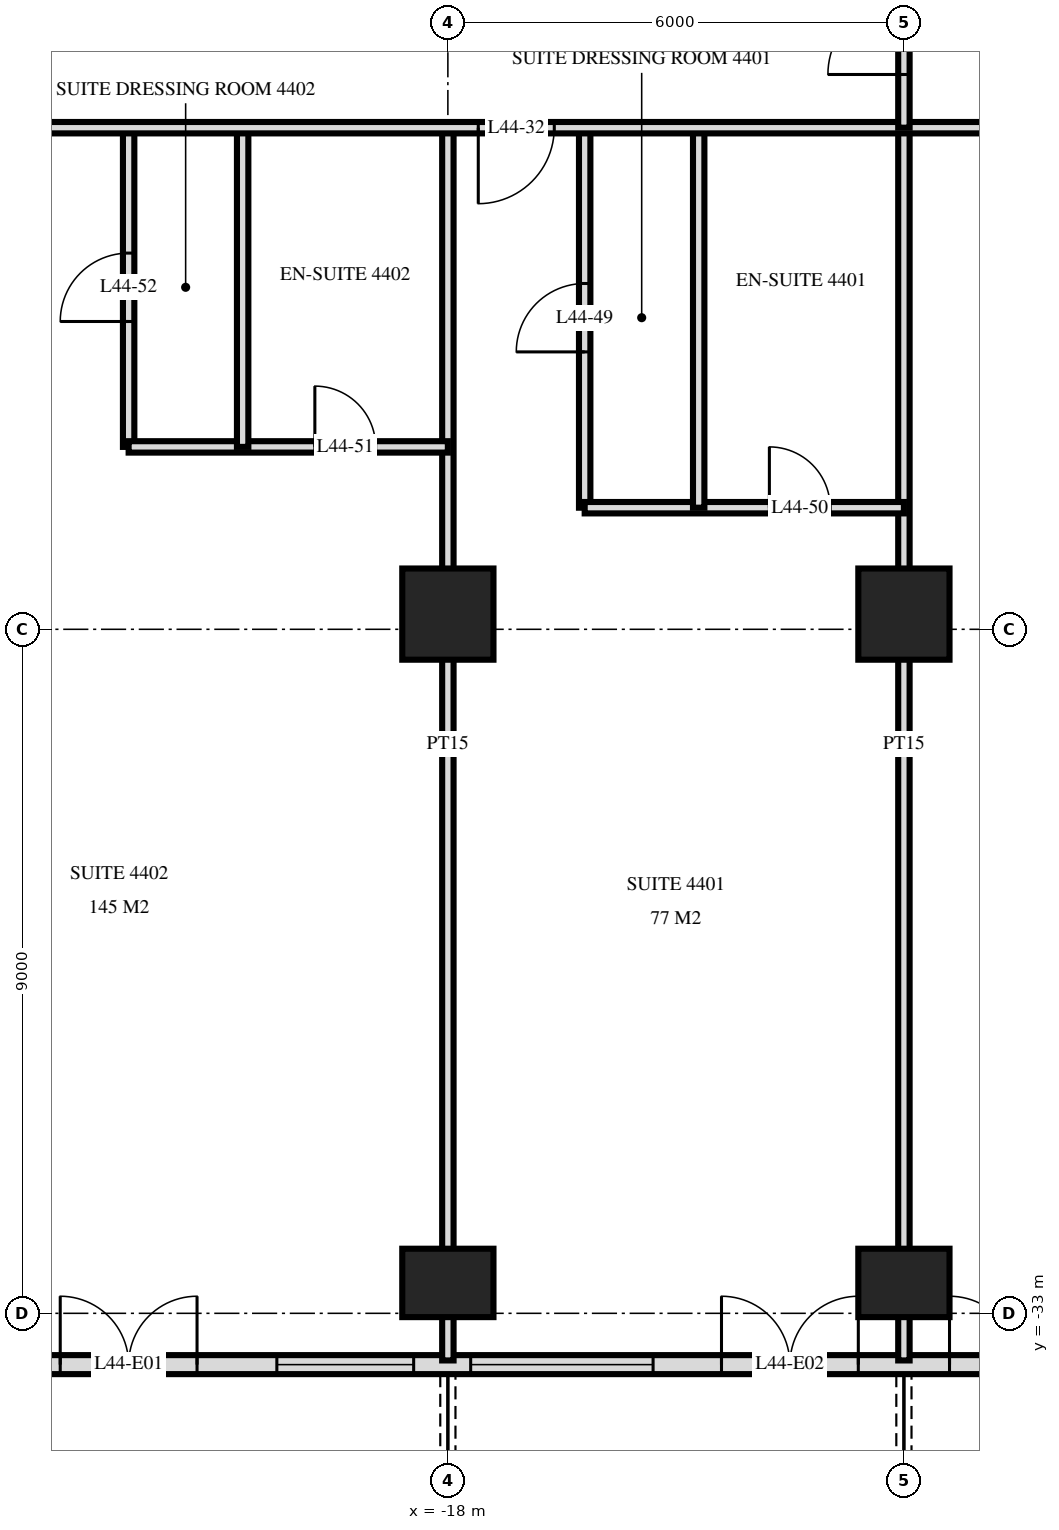
"""IFC4 building model, lengths in metres.
Left out: names, types, materials, properties, quantities, classifications, styles, units other than length and angle.
Written with IfcOpenShell. Run it as: python <this file> out.ifc"""

import sys

from ifc_helpers import new_model, si_unit, direction, frame, frame_2d, origin, origin_2d, place, context, subcontext, project, spatial, rectangle, extrude, element, fill, save


model = new_model("IFC4")
c1 = context("Model", 3, precision=1e-05, world=origin(), true_north=direction((0.0, 1.0)))
c2 = subcontext(c1, "Body", "Model", "MODEL_VIEW")
j1 = project(units=[si_unit("LENGTHUNIT", "METRE"), si_unit("PLANEANGLEUNIT", "RADIAN")], contexts=[c1])
p1 = place(None, origin())
s1 = spatial("IfcSite", under=j1, at=p1, CompositionType="ELEMENT")
p2 = place(p1, origin())
s2 = spatial("IfcBuilding", under=s1, at=p2, CompositionType="ELEMENT")
p3 = place(p2, frame((0.0, 0.0, 170.4)))
s3 = spatial("IfcBuildingStorey", under=s2, at=p3, CompositionType="ELEMENT", Elevation=170.4)
p4 = place(p3, frame((-18.0, -32.6, 0.0), z_axis=(0.0, 0.0, 1.0), x_axis=(1.0, 0.0, 0.0)))
e1 = element("IfcColumn", 1, at=p4, inside=s3, PredefinedType="COLUMN", context=c2, shape_type="SweptSolid", body=[
    extrude(rectangle(XDim=1.2, YDim=0.9, at=origin_2d()), origin(), (0.0, 0.0, 1.0), 3.6),
])
p5 = place(p3, frame((-18.0, -23.8, 0.0), z_axis=(0.0, 0.0, 1.0), x_axis=(1.0, 0.0, 0.0)))
e2 = element("IfcColumn", 2, at=p5, inside=s3, PredefinedType="COLUMN", context=c2, shape_type="SweptSolid", body=[
    extrude(rectangle(XDim=1.2, YDim=1.2, at=origin_2d()), origin(), (0.0, 0.0, 1.0), 3.6),
])
p6 = place(p3, frame((-12.0, -32.6, 0.0), z_axis=(0.0, 0.0, 1.0), x_axis=(1.0, 0.0, 0.0)))
e3 = element("IfcColumn", 3, at=p6, inside=s3, PredefinedType="COLUMN", context=c2, shape_type="SweptSolid", body=[
    extrude(rectangle(XDim=1.2, YDim=0.9, at=origin_2d()), origin(), (0.0, 0.0, 1.0), 3.6),
])
p7 = place(p3, frame((-12.0, -23.8, 0.0), z_axis=(0.0, 0.0, 1.0), x_axis=(1.0, 0.0, 0.0)))
e4 = element("IfcColumn", 4, at=p7, inside=s3, PredefinedType="COLUMN", context=c2, shape_type="SweptSolid", body=[
    extrude(rectangle(XDim=1.2, YDim=1.2, at=origin_2d()), origin(), (0.0, 0.0, 1.0), 3.6),
])
p8 = place(p3, frame((-23.675, -33.675, 0.0), z_axis=(0.0, 0.0, 1.0), x_axis=(1.0, 0.0, 0.0)))
e5 = element("IfcWall", 5, at=p8, inside=s3, PredefinedType="SOLIDWALL", context=c2, shape_type="SweptSolid", body=[
    extrude(rectangle(XDim=47.351, YDim=0.25, at=frame_2d((23.675, 0.0))), origin(), (0.0, 0.0, 1.0), 3.32),
])
p9 = place(p8, frame((0.575, 0.0, 0.0)))
e6 = element("IfcOpeningElement", 6, at=p9, cuts=e5, PredefinedType="OPENING", context=c2, shape_type="SweptSolid", body=[
    extrude(rectangle(XDim=1.8, YDim=2.4, at=frame_2d((0.9, 1.2))), frame((0.0, 0.135, 0.0), z_axis=(0.0, -1.0, 0.0), x_axis=(1.0, 0.0, 0.0)), (0.0, 0.0, 1.0), 0.27),
])
p10 = place(p8, frame((3.425, 0.0, 0.3)))
e7 = element("IfcOpeningElement", 7, at=p10, cuts=e5, PredefinedType="OPENING", context=c2, shape_type="SweptSolid", body=[
    extrude(rectangle(XDim=1.8, YDim=2.1, at=frame_2d((0.9, 1.05))), frame((0.0, 0.135, 0.0), z_axis=(0.0, -1.0, 0.0), x_axis=(1.0, 0.0, 0.0)), (0.0, 0.0, 1.0), 0.27),
])
p11 = place(p8, frame((5.975, 0.0, 0.3)))
e8 = element("IfcOpeningElement", 8, at=p11, cuts=e5, PredefinedType="OPENING", context=c2, shape_type="SweptSolid", body=[
    extrude(rectangle(XDim=2.4, YDim=2.1, at=frame_2d((1.2, 1.05))), frame((0.0, 0.135, 0.0), z_axis=(0.0, -1.0, 0.0), x_axis=(1.0, 0.0, 0.0)), (0.0, 0.0, 1.0), 0.27),
])
p12 = place(p8, frame((9.275, 0.0, 0.0)))
e9 = element("IfcOpeningElement", 9, at=p12, cuts=e5, PredefinedType="OPENING", context=c2, shape_type="SweptSolid", body=[
    extrude(rectangle(XDim=1.8, YDim=2.4, at=frame_2d((0.9, 1.2))), frame((0.0, 0.135, 0.0), z_axis=(0.0, -1.0, 0.0), x_axis=(1.0, 0.0, 0.0)), (0.0, 0.0, 1.0), 0.27),
])
p13 = place(p8, frame((12.275, 0.0, 0.0)))
e10 = element("IfcOpeningElement", 10, at=p13, cuts=e5, PredefinedType="OPENING", context=c2, shape_type="SweptSolid", body=[
    extrude(rectangle(XDim=1.8, YDim=2.4, at=frame_2d((0.9, 1.2))), frame((0.0, 0.135, 0.0), z_axis=(0.0, -1.0, 0.0), x_axis=(1.0, 0.0, 0.0)), (0.0, 0.0, 1.0), 0.27),
])
p14 = place(p8, frame((14.975, 0.0, 0.3)))
e11 = element("IfcOpeningElement", 11, at=p14, cuts=e5, PredefinedType="OPENING", context=c2, shape_type="SweptSolid", body=[
    extrude(rectangle(XDim=2.4, YDim=2.1, at=frame_2d((1.2, 1.05))), frame((0.0, 0.135, 0.0), z_axis=(0.0, -1.0, 0.0), x_axis=(1.0, 0.0, 0.0)), (0.0, 0.0, 1.0), 0.27),
])
p15 = place(p8, frame((17.975, 0.0, 0.3)))
e12 = element("IfcOpeningElement", 12, at=p15, cuts=e5, PredefinedType="OPENING", context=c2, shape_type="SweptSolid", body=[
    extrude(rectangle(XDim=2.4, YDim=2.1, at=frame_2d((1.2, 1.05))), frame((0.0, 0.135, 0.0), z_axis=(0.0, -1.0, 0.0), x_axis=(1.0, 0.0, 0.0)), (0.0, 0.0, 1.0), 0.27),
])
p16 = place(p8, frame((21.275, 0.0, 0.0)))
e13 = element("IfcOpeningElement", 13, at=p16, cuts=e5, PredefinedType="OPENING", context=c2, shape_type="SweptSolid", body=[
    extrude(rectangle(XDim=1.8, YDim=2.4, at=frame_2d((0.9, 1.2))), frame((0.0, 0.135, 0.0), z_axis=(0.0, -1.0, 0.0), x_axis=(1.0, 0.0, 0.0)), (0.0, 0.0, 1.0), 0.27),
])
p17 = place(p8, frame((24.275, 0.0, 0.0)))
e14 = element("IfcOpeningElement", 14, at=p17, cuts=e5, PredefinedType="OPENING", context=c2, shape_type="SweptSolid", body=[
    extrude(rectangle(XDim=1.8, YDim=2.4, at=frame_2d((0.9, 1.2))), frame((0.0, 0.135, 0.0), z_axis=(0.0, -1.0, 0.0), x_axis=(1.0, 0.0, 0.0)), (0.0, 0.0, 1.0), 0.27),
])
p18 = place(p8, frame((26.975, 0.0, 0.3)))
e15 = element("IfcOpeningElement", 15, at=p18, cuts=e5, PredefinedType="OPENING", context=c2, shape_type="SweptSolid", body=[
    extrude(rectangle(XDim=2.4, YDim=2.1, at=frame_2d((1.2, 1.05))), frame((0.0, 0.135, 0.0), z_axis=(0.0, -1.0, 0.0), x_axis=(1.0, 0.0, 0.0)), (0.0, 0.0, 1.0), 0.27),
])
p19 = place(p8, frame((30.275, 0.0, 0.0)))
e16 = element("IfcOpeningElement", 16, at=p19, cuts=e5, PredefinedType="OPENING", context=c2, shape_type="SweptSolid", body=[
    extrude(rectangle(XDim=1.8, YDim=2.4, at=frame_2d((0.9, 1.2))), frame((0.0, 0.135, 0.0), z_axis=(0.0, -1.0, 0.0), x_axis=(1.0, 0.0, 0.0)), (0.0, 0.0, 1.0), 0.27),
])
p20 = place(p8, frame((32.975, 0.0, 0.3)))
e17 = element("IfcOpeningElement", 17, at=p20, cuts=e5, PredefinedType="OPENING", context=c2, shape_type="SweptSolid", body=[
    extrude(rectangle(XDim=2.4, YDim=2.1, at=frame_2d((1.2, 1.05))), frame((0.0, 0.135, 0.0), z_axis=(0.0, -1.0, 0.0), x_axis=(1.0, 0.0, 0.0)), (0.0, 0.0, 1.0), 0.27),
])
p21 = place(p8, frame((35.975, 0.0, 0.3)))
e18 = element("IfcOpeningElement", 18, at=p21, cuts=e5, PredefinedType="OPENING", context=c2, shape_type="SweptSolid", body=[
    extrude(rectangle(XDim=2.4, YDim=2.1, at=frame_2d((1.2, 1.05))), frame((0.0, 0.135, 0.0), z_axis=(0.0, -1.0, 0.0), x_axis=(1.0, 0.0, 0.0)), (0.0, 0.0, 1.0), 0.27),
])
p22 = place(p8, frame((39.275, 0.0, 0.0)))
e19 = element("IfcOpeningElement", 19, at=p22, cuts=e5, PredefinedType="OPENING", context=c2, shape_type="SweptSolid", body=[
    extrude(rectangle(XDim=1.8, YDim=2.4, at=frame_2d((0.9, 1.2))), frame((0.0, 0.135, 0.0), z_axis=(0.0, -1.0, 0.0), x_axis=(1.0, 0.0, 0.0)), (0.0, 0.0, 1.0), 0.27),
])
p23 = place(p8, frame((42.275, 0.0, 0.0)))
e20 = element("IfcOpeningElement", 20, at=p23, cuts=e5, PredefinedType="OPENING", context=c2, shape_type="SweptSolid", body=[
    extrude(rectangle(XDim=1.8, YDim=2.4, at=frame_2d((0.9, 1.2))), frame((0.0, 0.135, 0.0), z_axis=(0.0, -1.0, 0.0), x_axis=(1.0, 0.0, 0.0)), (0.0, 0.0, 1.0), 0.27),
])
p24 = place(p8, frame((45.125, 0.0, 0.3)))
e21 = element("IfcOpeningElement", 21, at=p24, cuts=e5, PredefinedType="OPENING", context=c2, shape_type="SweptSolid", body=[
    extrude(rectangle(XDim=1.8, YDim=2.1, at=frame_2d((0.9, 1.05))), frame((0.0, 0.135, 0.0), z_axis=(0.0, -1.0, 0.0), x_axis=(1.0, 0.0, 0.0)), (0.0, 0.0, 1.0), 0.27),
])
p25 = place(p3, frame((-12.0, -17.4, 0.0), z_axis=(0.0, 0.0, 1.0), x_axis=(0.0, 1.0, 0.0)))
e22 = element("IfcWall", 22, at=p25, inside=s3, PredefinedType="PARTITIONING", context=c2, shape_type="SweptSolid", body=[
    extrude(rectangle(XDim=2.35, YDim=0.15, at=frame_2d((1.175, 0.0))), origin(), (0.0, 0.0, 1.0), 3.32),
])
p26 = place(p25, frame((0.7, 0.0, 0.0)))
e23 = element("IfcOpeningElement", 23, at=p26, cuts=e22, PredefinedType="OPENING", context=c2, shape_type="SweptSolid", body=[
    extrude(rectangle(XDim=1.0, YDim=2.1, at=frame_2d((0.5, 1.05))), frame((0.0, 0.085, 0.0), z_axis=(0.0, -1.0, 0.0), x_axis=(1.0, 0.0, 0.0)), (0.0, 0.0, 1.0), 0.17),
])
p27 = place(p3, frame((-12.0, -33.62, 0.0), z_axis=(0.0, 0.0, 1.0), x_axis=(0.0, 1.0, 0.0)))
e24 = element("IfcWall", 24, at=p27, inside=s3, PredefinedType="PARTITIONING", context=c2, shape_type="SweptSolid", body=[
    extrude(rectangle(XDim=16.22, YDim=0.15, at=frame_2d((8.11, 0.0))), origin(), (0.0, 0.0, 1.0), 3.32),
])
p28 = place(p3, frame((-14.7, -22.4, 0.0), z_axis=(0.0, 0.0, 1.0), x_axis=(0.0, 1.0, 0.0)))
e25 = element("IfcWall", 25, at=p28, inside=s3, PredefinedType="PARTITIONING", context=c2, shape_type="SweptSolid", body=[
    extrude(rectangle(XDim=5.0, YDim=0.15, at=frame_2d((2.5, 0.0))), origin(), (0.0, 0.0, 1.0), 3.32),
])
p29 = place(p3, frame((-16.2, -22.4, 0.0), z_axis=(0.0, 0.0, 1.0), x_axis=(0.0, 1.0, 0.0)))
e26 = element("IfcWall", 26, at=p29, inside=s3, PredefinedType="PARTITIONING", context=c2, shape_type="SweptSolid", body=[
    extrude(rectangle(XDim=5.0, YDim=0.15, at=frame_2d((2.5, 0.0))), origin(), (0.0, 0.0, 1.0), 3.32),
])
p30 = place(p29, frame((2.05, 0.0, 0.0)))
e27 = element("IfcOpeningElement", 27, at=p30, cuts=e26, PredefinedType="OPENING", context=c2, shape_type="SweptSolid", body=[
    extrude(rectangle(XDim=0.9, YDim=2.1, at=frame_2d((0.45, 1.05))), frame((0.0, 0.085, 0.0), z_axis=(0.0, -1.0, 0.0), x_axis=(1.0, 0.0, 0.0)), (0.0, 0.0, 1.0), 0.17),
])
p31 = place(p3, frame((-18.0, -33.62, 0.0), z_axis=(0.0, 0.0, 1.0), x_axis=(0.0, 1.0, 0.0)))
e28 = element("IfcWall", 28, at=p31, inside=s3, PredefinedType="PARTITIONING", context=c2, shape_type="SweptSolid", body=[
    extrude(rectangle(XDim=16.22, YDim=0.15, at=frame_2d((8.11, 0.0))), origin(), (0.0, 0.0, 1.0), 3.32),
])
p32 = place(p3, frame((-20.7, -21.6, 0.0), z_axis=(0.0, 0.0, 1.0), x_axis=(0.0, 1.0, 0.0)))
e29 = element("IfcWall", 29, at=p32, inside=s3, PredefinedType="PARTITIONING", context=c2, shape_type="SweptSolid", body=[
    extrude(rectangle(XDim=4.2, YDim=0.15, at=frame_2d((2.1, 0.0))), origin(), (0.0, 0.0, 1.0), 3.32),
])
p33 = place(p3, frame((-22.2, -21.6, 0.0), z_axis=(0.0, 0.0, 1.0), x_axis=(0.0, 1.0, 0.0)))
e30 = element("IfcWall", 30, at=p33, inside=s3, PredefinedType="PARTITIONING", context=c2, shape_type="SweptSolid", body=[
    extrude(rectangle(XDim=4.2, YDim=0.15, at=frame_2d((2.1, 0.0))), origin(), (0.0, 0.0, 1.0), 3.32),
])
p34 = place(p33, frame((1.65, 0.0, 0.0)))
e31 = element("IfcOpeningElement", 31, at=p34, cuts=e30, PredefinedType="OPENING", context=c2, shape_type="SweptSolid", body=[
    extrude(rectangle(XDim=0.9, YDim=2.1, at=frame_2d((0.45, 1.05))), frame((0.0, 0.085, 0.0), z_axis=(0.0, -1.0, 0.0), x_axis=(1.0, 0.0, 0.0)), (0.0, 0.0, 1.0), 0.17),
])
p35 = place(p3, frame((-16.2, -22.4, 0.0), z_axis=(0.0, 0.0, 1.0), x_axis=(1.0, 0.0, 0.0)))
e32 = element("IfcWall", 32, at=p35, inside=s3, PredefinedType="PARTITIONING", context=c2, shape_type="SweptSolid", body=[
    extrude(rectangle(XDim=4.2, YDim=0.15, at=frame_2d((2.1, 0.0))), origin(), (0.0, 0.0, 1.0), 3.32),
])
p36 = place(p35, frame((2.43, 0.0, 0.0)))
e33 = element("IfcOpeningElement", 33, at=p36, cuts=e32, PredefinedType="OPENING", context=c2, shape_type="SweptSolid", body=[
    extrude(rectangle(XDim=0.8, YDim=2.1, at=frame_2d((0.4, 1.05))), frame((0.0, 0.085, 0.0), z_axis=(0.0, -1.0, 0.0), x_axis=(1.0, 0.0, 0.0)), (0.0, 0.0, 1.0), 0.17),
])
p37 = place(p3, frame((-22.2, -21.6, 0.0), z_axis=(0.0, 0.0, 1.0), x_axis=(1.0, 0.0, 0.0)))
e34 = element("IfcWall", 34, at=p37, inside=s3, PredefinedType="PARTITIONING", context=c2, shape_type="SweptSolid", body=[
    extrude(rectangle(XDim=4.2, YDim=0.15, at=frame_2d((2.1, 0.0))), origin(), (0.0, 0.0, 1.0), 3.32),
])
p38 = place(p37, frame((2.45, 0.0, 0.0)))
e35 = element("IfcOpeningElement", 35, at=p38, cuts=e34, PredefinedType="OPENING", context=c2, shape_type="SweptSolid", body=[
    extrude(rectangle(XDim=0.8, YDim=2.1, at=frame_2d((0.4, 1.05))), frame((0.0, 0.085, 0.0), z_axis=(0.0, -1.0, 0.0), x_axis=(1.0, 0.0, 0.0)), (0.0, 0.0, 1.0), 0.17),
])
p39 = place(p3, frame((-28.02, -17.4, 0.0), z_axis=(0.0, 0.0, 1.0), x_axis=(1.0, 0.0, 0.0)))
e36 = element("IfcWall", 36, at=p39, inside=s3, PredefinedType="PARTITIONING", context=c2, shape_type="SweptSolid", body=[
    extrude(rectangle(XDim=56.04, YDim=0.15, at=frame_2d((28.02, 0.0))), origin(), (0.0, 0.0, 1.0), 3.32),
])
p40 = place(p39, frame((10.42, 0.0, 0.0)))
e37 = element("IfcOpeningElement", 37, at=p40, cuts=e36, PredefinedType="OPENING", context=c2, shape_type="SweptSolid", body=[
    extrude(rectangle(XDim=1.0, YDim=2.1, at=frame_2d((0.5, 1.05))), frame((0.0, 0.085, 0.0), z_axis=(0.0, -1.0, 0.0), x_axis=(1.0, 0.0, 0.0)), (0.0, 0.0, 1.0), 0.17),
])
p41 = place(p39, frame((2.32, 0.0, 0.0)))
e38 = element("IfcOpeningElement", 38, at=p41, cuts=e36, PredefinedType="OPENING", context=c2, shape_type="SweptSolid", body=[
    extrude(rectangle(XDim=1.0, YDim=2.1, at=frame_2d((0.5, 1.05))), frame((0.0, 0.085, 0.0), z_axis=(0.0, -1.0, 0.0), x_axis=(1.0, 0.0, 0.0)), (0.0, 0.0, 1.0), 0.17),
])
p42 = place(p39, frame((49.72, 0.0, 0.0)))
e39 = element("IfcOpeningElement", 39, at=p42, cuts=e36, PredefinedType="OPENING", context=c2, shape_type="SweptSolid", body=[
    extrude(rectangle(XDim=1.0, YDim=2.1, at=frame_2d((0.5, 1.05))), frame((0.0, 0.085, 0.0), z_axis=(0.0, -1.0, 0.0), x_axis=(1.0, 0.0, 0.0)), (0.0, 0.0, 1.0), 0.17),
])
p43 = place(p39, frame((23.02, 0.0, 0.0)))
e40 = element("IfcOpeningElement", 40, at=p43, cuts=e36, PredefinedType="OPENING", context=c2, shape_type="SweptSolid", body=[
    extrude(rectangle(XDim=1.0, YDim=2.1, at=frame_2d((0.5, 1.05))), frame((0.0, 0.085, 0.0), z_axis=(0.0, -1.0, 0.0), x_axis=(1.0, 0.0, 0.0)), (0.0, 0.0, 1.0), 0.17),
])
p44 = place(p39, frame((35.02, 0.0, 0.0)))
e41 = element("IfcOpeningElement", 41, at=p44, cuts=e36, PredefinedType="OPENING", context=c2, shape_type="SweptSolid", body=[
    extrude(rectangle(XDim=1.0, YDim=2.1, at=frame_2d((0.5, 1.05))), frame((0.0, 0.085, 0.0), z_axis=(0.0, -1.0, 0.0), x_axis=(1.0, 0.0, 0.0)), (0.0, 0.0, 1.0), 0.17),
])
p45 = place(p9, origin())
e42 = element("IfcDoor", 42, at=p45, inside=s3, OperationType="DOUBLE_DOOR_SINGLE_SWING", PredefinedType="DOOR", context=c2, shape_type="SweptSolid", body=[
    extrude(rectangle(XDim=1.8, YDim=2.4, at=frame_2d((0.9, 1.2))), frame((0.0, 0.025, 0.0), z_axis=(0.0, -1.0, 0.0), x_axis=(1.0, 0.0, 0.0)), (0.0, 0.0, 1.0), 0.05),
])
fill(e6, e42)
p46 = place(p10, origin())
e43 = element("IfcWindow", 43, at=p46, inside=s3, PartitioningType="SINGLE_PANEL", PredefinedType="WINDOW", context=c2, shape_type="SweptSolid", body=[
    extrude(rectangle(XDim=1.8, YDim=2.1, at=frame_2d((0.9, 1.05))), frame((0.0, 0.03, 0.0), z_axis=(0.0, -1.0, 0.0), x_axis=(1.0, 0.0, 0.0)), (0.0, 0.0, 1.0), 0.06),
])
fill(e7, e43)
p47 = place(p11, origin())
e44 = element("IfcWindow", 44, at=p47, inside=s3, PartitioningType="SINGLE_PANEL", PredefinedType="WINDOW", context=c2, shape_type="SweptSolid", body=[
    extrude(rectangle(XDim=2.4, YDim=2.1, at=frame_2d((1.2, 1.05))), frame((0.0, 0.03, 0.0), z_axis=(0.0, -1.0, 0.0), x_axis=(1.0, 0.0, 0.0)), (0.0, 0.0, 1.0), 0.06),
])
fill(e8, e44)
p48 = place(p12, origin())
e45 = element("IfcDoor", 45, at=p48, inside=s3, OperationType="DOUBLE_DOOR_SINGLE_SWING", PredefinedType="DOOR", context=c2, shape_type="SweptSolid", body=[
    extrude(rectangle(XDim=1.8, YDim=2.4, at=frame_2d((0.9, 1.2))), frame((0.0, 0.025, 0.0), z_axis=(0.0, -1.0, 0.0), x_axis=(1.0, 0.0, 0.0)), (0.0, 0.0, 1.0), 0.05),
])
fill(e9, e45)
p49 = place(p13, origin())
e46 = element("IfcDoor", 46, at=p49, inside=s3, OperationType="DOUBLE_DOOR_SINGLE_SWING", PredefinedType="DOOR", context=c2, shape_type="SweptSolid", body=[
    extrude(rectangle(XDim=1.8, YDim=2.4, at=frame_2d((0.9, 1.2))), frame((0.0, 0.025, 0.0), z_axis=(0.0, -1.0, 0.0), x_axis=(1.0, 0.0, 0.0)), (0.0, 0.0, 1.0), 0.05),
])
fill(e10, e46)
p50 = place(p26, origin())
e47 = element("IfcDoor", 47, at=p50, inside=s3, OperationType="SINGLE_SWING_RIGHT", PredefinedType="DOOR", context=c2, shape_type="SweptSolid", body=[
    extrude(rectangle(XDim=1.0, YDim=2.1, at=frame_2d((0.5, 1.05))), frame((0.0, 0.025, 0.0), z_axis=(0.0, -1.0, 0.0), x_axis=(1.0, 0.0, 0.0)), (0.0, 0.0, 1.0), 0.05),
])
fill(e23, e47)
p51 = place(p40, frame((0.5, 0.0, 0.0), z_axis=(0.0, 0.0, 1.0), x_axis=(-1.0, 0.0, 0.0)))
e48 = element("IfcDoor", 48, at=p51, inside=s3, OperationType="SINGLE_SWING_LEFT", PredefinedType="DOOR", context=c2, shape_type="SweptSolid", body=[
    extrude(rectangle(XDim=1.0, YDim=2.1, at=frame_2d((0.0, 1.05))), frame((0.0, -0.025, 0.0), z_axis=(0.0, 1.0, 0.0), x_axis=(-1.0, 0.0, 0.0)), (0.0, 0.0, 1.0), 0.05),
])
fill(e37, e48)
p52 = place(p30, origin())
e49 = element("IfcDoor", 49, at=p52, inside=s3, OperationType="SINGLE_SWING_RIGHT", PredefinedType="DOOR", context=c2, shape_type="SweptSolid", body=[
    extrude(rectangle(XDim=0.9, YDim=2.1, at=frame_2d((0.45, 1.05))), frame((0.0, 0.025, 0.0), z_axis=(0.0, -1.0, 0.0), x_axis=(1.0, 0.0, 0.0)), (0.0, 0.0, 1.0), 0.05),
])
fill(e27, e49)
p53 = place(p36, origin())
e50 = element("IfcDoor", 50, at=p53, inside=s3, OperationType="SINGLE_SWING_RIGHT", PredefinedType="DOOR", context=c2, shape_type="SweptSolid", body=[
    extrude(rectangle(XDim=0.8, YDim=2.1, at=frame_2d((0.4, 1.05))), frame((0.0, 0.025, 0.0), z_axis=(0.0, -1.0, 0.0), x_axis=(1.0, 0.0, 0.0)), (0.0, 0.0, 1.0), 0.05),
])
fill(e33, e50)
p54 = place(p38, origin())
e51 = element("IfcDoor", 51, at=p54, inside=s3, OperationType="SINGLE_SWING_RIGHT", PredefinedType="DOOR", context=c2, shape_type="SweptSolid", body=[
    extrude(rectangle(XDim=0.8, YDim=2.1, at=frame_2d((0.4, 1.05))), frame((0.0, 0.025, 0.0), z_axis=(0.0, -1.0, 0.0), x_axis=(1.0, 0.0, 0.0)), (0.0, 0.0, 1.0), 0.05),
])
fill(e35, e51)
p55 = place(p34, origin())
e52 = element("IfcDoor", 52, at=p55, inside=s3, OperationType="SINGLE_SWING_RIGHT", PredefinedType="DOOR", context=c2, shape_type="SweptSolid", body=[
    extrude(rectangle(XDim=0.9, YDim=2.1, at=frame_2d((0.45, 1.05))), frame((0.0, 0.025, 0.0), z_axis=(0.0, -1.0, 0.0), x_axis=(1.0, 0.0, 0.0)), (0.0, 0.0, 1.0), 0.05),
])
fill(e31, e52)
save(model, sys.argv[1])
